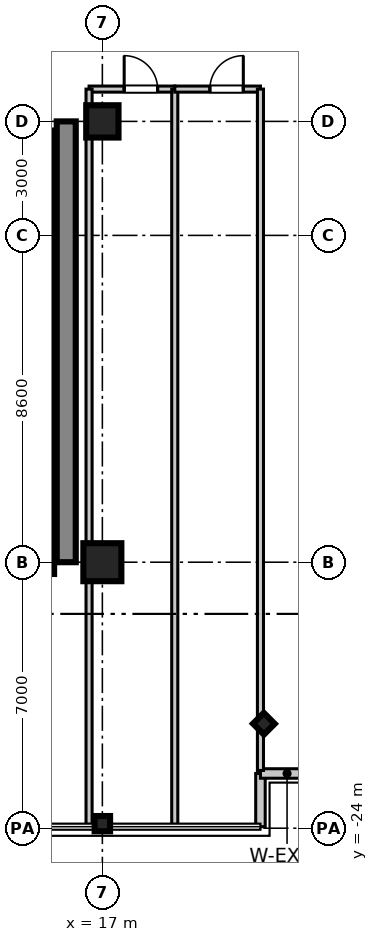
"""IFC4 building model, lengths in metres.
Left out: names, types, materials, properties, quantities, classifications, styles, units other than length and angle.
Written with IfcOpenShell. Run it as: python <this file> out.ifc"""

import sys

from ifc_helpers import new_model, si_unit, direction, frame, frame_2d, origin, origin_2d, place, context, subcontext, project, spatial, rectangle, i_section, extrude, source, transform, mapped, element, fill, save


model = new_model("IFC4")
c1 = context("Model", 3, precision=1e-05, world=origin(), true_north=direction((0.0, 1.0)))
c2 = subcontext(c1, "Body", "Model", "MODEL_VIEW")
j1 = project(units=[si_unit("LENGTHUNIT", "METRE"), si_unit("PLANEANGLEUNIT", "RADIAN")], contexts=[c1])
p1 = place(None, origin())
s1 = spatial("IfcSite", under=j1, at=p1, CompositionType="ELEMENT")
p2 = place(p1, origin())
s2 = spatial("IfcBuilding", under=s1, at=p2, CompositionType="ELEMENT")
p3 = place(p2, frame((0.0, 0.0, 219.7)))
s3 = spatial("IfcBuildingStorey", under=s2, at=p3, CompositionType="ELEMENT", Elevation=219.7)
m1 = source(origin(), c2, "Body", "SweptSolid", [
    extrude(rectangle(XDim=1.0, YDim=1.0, at=origin_2d()), origin(), (0.0, 0.0, 1.0), 3.655),
])
p4 = place(p3, frame((17.0, -17.0, 0.0), z_axis=(0.0, 0.0, 1.0), x_axis=(1.0, 0.0, 0.0)))
e1 = element("IfcColumn", 1, at=p4, inside=s3, PredefinedType="COLUMN", context=c2, shape_type="MappedRepresentation", body=[
    mapped(m1, transform((0.0, 0.0, 0.0), scale=1.0)),
])
m2 = source(origin(), c2, "Body", "SweptSolid", [
    extrude(rectangle(XDim=0.85, YDim=0.85, at=origin_2d()), origin(), (0.0, 0.0, 1.0), 3.655),
])
p5 = place(p3, frame((17.0, -5.4, 0.0), z_axis=(0.0, 0.0, 1.0), x_axis=(1.0, 0.0, 0.0)))
e2 = element("IfcColumn", 2, at=p5, inside=s3, PredefinedType="PILASTER", context=c2, shape_type="MappedRepresentation", body=[
    mapped(m2, transform((0.0, 0.0, 0.0), scale=1.0)),
])
m3 = source(origin(), c2, "Body", "SweptSolid", [
    extrude(i_section(OverallWidth=0.401, OverallDepth=0.406, WebThickness=0.016, FlangeThickness=0.025, at=origin_2d()), origin(), (0.0, 0.0, 1.0), 3.655),
])
for number, where, z_axis, x_axis in (
    (3, (17.0, -23.88, 0.0), (0.0, 0.0, 1.0), (0.0, 1.0, 0.0)),
    (4, (21.25, -21.25, 0.0), (0.0, 0.0, 1.0), (0.707, 0.707, 0.0)),
):
    element("IfcColumn", number, at=place(p3, frame(where, z_axis=z_axis, x_axis=x_axis)), inside=s3, PredefinedType="COLUMN", context=c2, shape_type="MappedRepresentation", body=[
        mapped(m3, transform((0.0, 0.0, 0.0), scale=1.0)),
    ])
m4 = source(origin(), c2, "Body", "SweptSolid", [
    extrude(rectangle(XDim=11.6, YDim=0.5, at=frame_2d((5.8, 0.0))), origin(), (0.0, 0.0, 1.0), 3.41),
])
p6 = place(p3, frame((16.05, -17.0, 0.0), z_axis=(0.0, 0.0, 1.0), x_axis=(0.0, 1.0, 0.0)))
e5 = element("IfcWall", 5, at=p6, inside=s3, PredefinedType="SHEAR", context=c2, shape_type="MappedRepresentation", body=[
    mapped(m4, transform((0.0, 0.0, 0.0), scale=1.0)),
])
m5 = source(origin(), c2, "Body", "SweptSolid", [
    extrude(rectangle(XDim=2.36, YDim=0.22, at=frame_2d((1.18, 0.0))), origin(), (0.0, 0.0, 1.0), 3.41),
])
p7 = place(p3, frame((15.62, -8.0, 0.0), z_axis=(0.0, 0.0, 1.0), x_axis=(0.0, 1.0, 0.0)))
e6 = element("IfcWall", 6, at=p7, inside=s3, PredefinedType="SHEAR", context=c2, shape_type="MappedRepresentation", body=[
    mapped(m5, transform((0.0, 0.0, 0.0), scale=1.0)),
])
m6 = source(origin(), c2, "Body", "SweptSolid", [
    extrude(rectangle(XDim=2.2, YDim=0.22, at=frame_2d((1.1, 0.0))), origin(), (0.0, 0.0, 1.0), 3.41),
])
for number, where, z_axis, x_axis in (
    (7, (15.62, -10.2, 0.0), (0.0, 0.0, 1.0), (0.0, 1.0, 0.0)),
    (8, (15.62, -12.4, 0.0), (0.0, 0.0, 1.0), (0.0, 1.0, 0.0)),
):
    element("IfcWall", number, at=place(p3, frame(where, z_axis=z_axis, x_axis=x_axis)), inside=s3, PredefinedType="SHEAR", context=c2, shape_type="MappedRepresentation", body=[
        mapped(m6, transform((0.0, 0.0, 0.0), scale=1.0)),
    ])
m7 = source(origin(), c2, "Body", "SweptSolid", [
    extrude(rectangle(XDim=2.3, YDim=0.22, at=frame_2d((1.15, 0.0))), origin(), (0.0, 0.0, 1.0), 3.41),
])
p8 = place(p3, frame((15.62, -14.7, 0.0), z_axis=(0.0, 0.0, 1.0), x_axis=(0.0, 1.0, 0.0)))
e9 = element("IfcWall", 9, at=p8, inside=s3, PredefinedType="SHEAR", context=c2, shape_type="MappedRepresentation", body=[
    mapped(m7, transform((0.0, 0.0, 0.0), scale=1.0)),
])
m8 = source(origin(), c2, "Body", "SweptSolid", [
    extrude(rectangle(XDim=2.61, YDim=0.22, at=frame_2d((1.305, 0.0))), origin(), (0.0, 0.0, 1.0), 3.41),
])
p9 = place(p3, frame((15.62, -17.31, 0.0), z_axis=(0.0, 0.0, 1.0), x_axis=(0.0, 1.0, 0.0)))
e10 = element("IfcWall", 10, at=p9, inside=s3, PredefinedType="SHEAR", context=c2, shape_type="MappedRepresentation", body=[
    mapped(m8, transform((0.0, 0.0, 0.0), scale=1.0)),
])
m9 = source(origin(), c2, "Body", "SweptSolid", [
    extrude(rectangle(XDim=1.4, YDim=0.25, at=frame_2d((0.7, 0.0))), origin(), (0.0, 0.0, 1.0), 3.41),
])
p10 = place(p3, frame((21.16, -23.96, 0.0), z_axis=(0.0, 0.0, 1.0), x_axis=(0.0, 1.0, 0.0)))
e11 = element("IfcWall", 11, at=p10, inside=s3, PredefinedType="STANDARD", context=c2, shape_type="MappedRepresentation", body=[
    mapped(m9, transform((0.0, 0.0, 0.0), scale=1.0)),
])
m10 = source(origin(), c2, "Body", "SweptSolid", [
    extrude(rectangle(XDim=1.4, YDim=0.25, at=frame_2d((0.7, 0.0))), origin(), (0.0, 0.0, 1.0), 3.41),
])
p11 = place(p3, frame((21.16, -22.56, 0.0), z_axis=(0.0, 0.0, 1.0), x_axis=(1.0, 0.0, 0.0)))
e12 = element("IfcWall", 12, at=p11, inside=s3, PredefinedType="STANDARD", context=c2, shape_type="MappedRepresentation", body=[
    mapped(m10, transform((0.0, 0.0, 0.0), scale=1.0)),
])
m11 = source(origin(), c2, "Body", "SweptSolid", [
    extrude(rectangle(XDim=2.255, YDim=0.16, at=frame_2d((1.127, 0.0))), origin(), (0.0, 0.0, 1.0), 2.75),
])
p12 = place(p3, frame((16.65, -4.55, 0.0), z_axis=(0.0, 0.0, 1.0), x_axis=(1.0, 0.0, 0.0)))
e13 = element("IfcWall", 13, at=p12, inside=s3, PredefinedType="PARTITIONING", context=c2, shape_type="MappedRepresentation", body=[
    mapped(m11, transform((0.0, 0.0, 0.0), scale=1.0)),
])
p13 = place(p12, frame((0.924, 0.0, 0.0)))
e14 = element("IfcOpeningElement", 14, at=p13, cuts=e13, PredefinedType="OPENING", context=c2, shape_type="SweptSolid", body=[
    extrude(rectangle(XDim=0.88, YDim=2.1, at=frame_2d((0.44, 1.05))), frame((0.0, 0.09, 0.0), z_axis=(0.0, -1.0, 0.0), x_axis=(1.0, 0.0, 0.0)), (0.0, 0.0, 1.0), 0.18),
])
m12 = source(origin(), c2, "Body", "SweptSolid", [
    extrude(rectangle(XDim=19.35, YDim=0.16, at=frame_2d((9.675, 0.0))), origin(), (0.0, 0.0, 1.0), 2.75),
])
for number, where, z_axis, x_axis in (
    (15, (16.65, -23.9, 0.0), (0.0, 0.0, 1.0), (0.0, 1.0, 0.0)),
    (16, (18.905, -23.9, 0.0), (0.0, 0.0, 1.0), (0.0, 1.0, 0.0)),
):
    element("IfcWall", number, at=place(p3, frame(where, z_axis=z_axis, x_axis=x_axis)), inside=s3, PredefinedType="PARTITIONING", context=c2, shape_type="MappedRepresentation", body=[
        mapped(m12, transform((0.0, 0.0, 0.0), scale=1.0)),
    ])
m13 = source(origin(), c2, "Body", "SweptSolid", [
    extrude(rectangle(XDim=2.255, YDim=0.16, at=frame_2d((1.127, 0.0))), origin(), (0.0, 0.0, 1.0), 2.75),
])
p14 = place(p3, frame((18.905, -4.55, 0.0), z_axis=(0.0, 0.0, 1.0), x_axis=(1.0, 0.0, 0.0)))
e17 = element("IfcWall", 17, at=p14, inside=s3, PredefinedType="PARTITIONING", context=c2, shape_type="MappedRepresentation", body=[
    mapped(m13, transform((0.0, 0.0, 0.0), scale=1.0)),
])
p15 = place(p14, frame((0.924, 0.0, 0.0)))
e18 = element("IfcOpeningElement", 18, at=p15, cuts=e17, PredefinedType="OPENING", context=c2, shape_type="SweptSolid", body=[
    extrude(rectangle(XDim=0.88, YDim=2.1, at=frame_2d((0.44, 1.05))), frame((0.0, 0.09, 0.0), z_axis=(0.0, -1.0, 0.0), x_axis=(1.0, 0.0, 0.0)), (0.0, 0.0, 1.0), 0.18),
])
m14 = source(origin(), c2, "Body", "SweptSolid", [
    extrude(rectangle(XDim=17.93, YDim=0.16, at=frame_2d((8.965, 0.0))), origin(), (0.0, 0.0, 1.0), 2.75),
])
p16 = place(p3, frame((21.16, -22.48, 0.0), z_axis=(0.0, 0.0, 1.0), x_axis=(0.0, 1.0, 0.0)))
e19 = element("IfcWall", 19, at=p16, inside=s3, PredefinedType="PARTITIONING", context=c2, shape_type="MappedRepresentation", body=[
    mapped(m14, transform((0.0, 0.0, 0.0), scale=1.0)),
])
m15 = source(origin(), c2, "Body", "SweptSolid", [
    extrude(rectangle(XDim=0.88, YDim=2.1, at=frame_2d((0.44, 1.05))), frame((0.0, 0.025, 0.0), z_axis=(0.0, -1.0, 0.0), x_axis=(1.0, 0.0, 0.0)), (0.0, 0.0, 1.0), 0.05),
])
p17 = place(p13, frame((0.88, 0.0, 0.0), z_axis=(0.0, 0.0, 1.0), x_axis=(-1.0, 0.0, 0.0)))
e20 = element("IfcDoor", 20, at=p17, inside=s3, OperationType="SINGLE_SWING_LEFT", PredefinedType="DOOR", context=c2, shape_type="MappedRepresentation", body=[
    mapped(m15, transform((0.0, 0.0, 0.0), scale=1.0)),
])
fill(e14, e20)
p18 = place(p15, frame((0.88, 0.0, 0.0), z_axis=(0.0, 0.0, 1.0), x_axis=(-1.0, 0.0, 0.0)))
e21 = element("IfcDoor", 21, at=p18, inside=s3, OperationType="SINGLE_SWING_RIGHT", PredefinedType="DOOR", context=c2, shape_type="MappedRepresentation", body=[
    mapped(m15, transform((0.0, 0.0, 0.0), scale=1.0)),
])
fill(e18, e21)
save(model, sys.argv[1])
